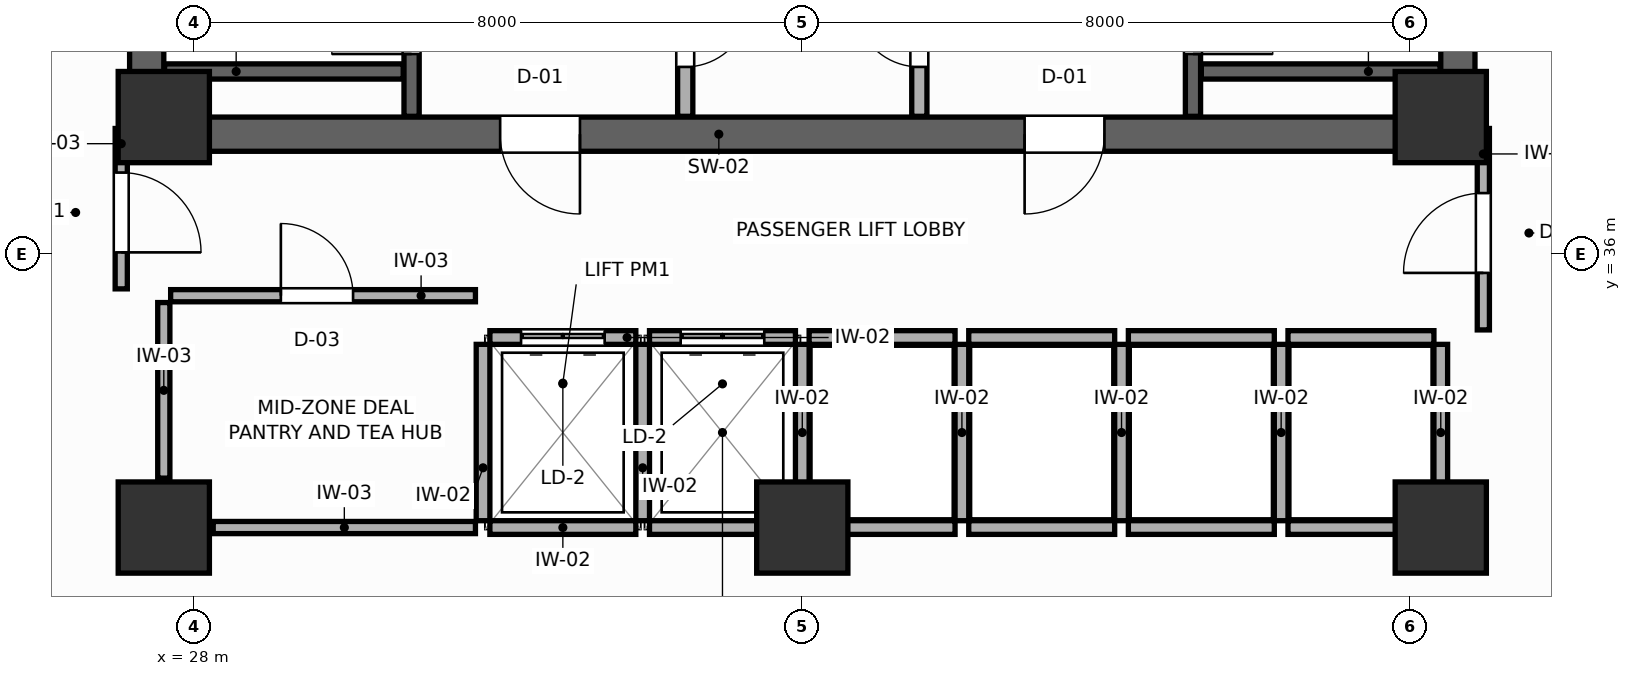
"""IFC4 building model, lengths in metres.
Left out: names, types, materials, properties, quantities, classifications, styles, units other than length and angle.
Written with IfcOpenShell. Run it as: python <this file> out.ifc"""

import sys

from ifc_helpers import new_model, si_unit, direction, frame, frame_2d, origin, origin_2d, place, context, subcontext, project, spatial, rectangle, extrude, source, transform, mapped, element, fill, save


model = new_model("IFC4")
c1 = context("Model", 3, precision=1e-05, world=origin(), true_north=direction((0.0, 1.0)))
c2 = subcontext(c1, "Body", "Model", "MODEL_VIEW")
j1 = project(units=[si_unit("LENGTHUNIT", "METRE"), si_unit("PLANEANGLEUNIT", "RADIAN")], contexts=[c1])
p1 = place(None, origin())
s1 = spatial("IfcSite", under=j1, at=p1, CompositionType="ELEMENT")
p2 = place(p1, origin())
s2 = spatial("IfcBuilding", under=s1, at=p2, CompositionType="ELEMENT")
p3 = place(p2, frame((0.0, 0.0, 139.8)))
s3 = spatial("IfcBuildingStorey", under=s2, at=p3, CompositionType="ELEMENT", Elevation=139.8)
p4 = place(p3, frame((27.15, 37.575, 0.0), z_axis=(0.0, 0.0, 1.0), x_axis=(1.0, 0.0, 0.0)))
e1 = element("IfcWall", 1, at=p4, inside=s3, PredefinedType="SHEAR", context=c2, shape_type="SweptSolid", body=[
    extrude(rectangle(XDim=17.7, YDim=0.45, at=frame_2d((8.85, 0.0))), origin(), (0.0, 0.0, 1.0), 3.6),
])
p5 = place(p4, frame((4.875, 0.0, 0.0)))
e2 = element("IfcOpeningElement", 2, at=p5, cuts=e1, PredefinedType="OPENING", context=c2, shape_type="SweptSolid", body=[
    extrude(rectangle(XDim=1.05, YDim=2.1, at=frame_2d((0.525, 1.05))), frame((0.0, 0.235, 0.0), z_axis=(0.0, -1.0, 0.0), x_axis=(1.0, 0.0, 0.0)), (0.0, 0.0, 1.0), 0.47),
])
p6 = place(p4, frame((11.775, 0.0, 0.0)))
e3 = element("IfcOpeningElement", 3, at=p6, cuts=e1, PredefinedType="OPENING", context=c2, shape_type="SweptSolid", body=[
    extrude(rectangle(XDim=1.05, YDim=2.1, at=frame_2d((0.525, 1.05))), frame((0.0, 0.235, 0.0), z_axis=(0.0, -1.0, 0.0), x_axis=(1.0, 0.0, 0.0)), (0.0, 0.0, 1.0), 0.47),
])
for number, where, z_axis, x_axis in (
    (4, (27.375, 37.8, 0.0), (0.0, 0.0, 1.0), (0.0, 1.0, 0.0)),
    (5, (44.625, 37.8, 0.0), (0.0, 0.0, 1.0), (0.0, 1.0, 0.0)),
):
    element("IfcWall", number, at=place(p3, frame(where, z_axis=z_axis, x_axis=x_axis)), inside=s3, PredefinedType="SHEAR", context=c2, shape_type="SweptSolid", body=[
        extrude(rectangle(XDim=9.0, YDim=0.45, at=frame_2d((4.5, 0.0))), origin(), (0.0, 0.0, 1.0), 3.6),
    ])
m1 = source(origin(), c2, "Body", "SweptSolid", [
    extrude(rectangle(XDim=1.2, YDim=1.2, at=origin_2d()), origin(), (0.0, 0.0, 1.0), 3.6),
])
for number, where, z_axis, x_axis in (
    (6, (27.6, 37.8, 0.0), (0.0, 0.0, 1.0), (1.0, 0.0, 0.0)),
    (7, (44.4, 37.8, 0.0), (0.0, 0.0, 1.0), (1.0, 0.0, 0.0)),
    (8, (27.6, 32.4, 0.0), (0.0, 0.0, 1.0), (1.0, 0.0, 0.0)),
    (9, (44.4, 32.4, 0.0), (0.0, 0.0, 1.0), (1.0, 0.0, 0.0)),
    (10, (36.0, 32.4, 0.0), (0.0, 0.0, 1.0), (1.0, 0.0, 0.0)),
):
    element("IfcColumn", number, at=place(p3, frame(where, z_axis=z_axis, x_axis=x_axis)), inside=s3, PredefinedType="COLUMN", context=c2, shape_type="MappedRepresentation", body=[
        mapped(m1, transform((0.0, 0.0, 0.0), scale=1.0)),
    ])
p7 = place(p3, frame((30.86, 37.81, 0.0), z_axis=(0.0, 0.0, 1.0), x_axis=(0.0, 1.0, 0.0)))
e11 = element("IfcWall", 11, at=p7, inside=s3, PredefinedType="SHEAR", context=c2, shape_type="SweptSolid", body=[
    extrude(rectangle(XDim=8.98, YDim=0.2, at=frame_2d((4.49, 0.0))), origin(), (0.0, 0.0, 1.0), 3.6),
])
p8 = place(p7, frame((0.82, 0.0, 0.0)))
e12 = element("IfcOpeningElement", 12, at=p8, cuts=e11, PredefinedType="OPENING", context=c2, shape_type="SweptSolid", body=[
    extrude(rectangle(XDim=1.05, YDim=2.1, at=frame_2d((0.525, 1.05))), frame((0.0, 0.11, 0.0), z_axis=(0.0, -1.0, 0.0), x_axis=(1.0, 0.0, 0.0)), (0.0, 0.0, 1.0), 0.22),
])
p9 = place(p3, frame((27.61, 38.4, 0.0), z_axis=(0.0, 0.0, 1.0), x_axis=(1.0, 0.0, 0.0)))
e13 = element("IfcWall", 13, at=p9, inside=s3, PredefinedType="SHEAR", context=c2, shape_type="SweptSolid", body=[
    extrude(rectangle(XDim=3.14, YDim=0.2, at=frame_2d((1.57, 0.0))), origin(), (0.0, 0.0, 1.0), 3.6),
])
p10 = place(p3, frame((41.14, 37.81, 0.0), z_axis=(0.0, 0.0, 1.0), x_axis=(0.0, 1.0, 0.0)))
e14 = element("IfcWall", 14, at=p10, inside=s3, PredefinedType="SHEAR", context=c2, shape_type="SweptSolid", body=[
    extrude(rectangle(XDim=8.98, YDim=0.2, at=frame_2d((4.49, 0.0))), origin(), (0.0, 0.0, 1.0), 3.6),
])
p11 = place(p10, frame((0.82, 0.0, 0.0)))
e15 = element("IfcOpeningElement", 15, at=p11, cuts=e14, PredefinedType="OPENING", context=c2, shape_type="SweptSolid", body=[
    extrude(rectangle(XDim=1.05, YDim=2.1, at=frame_2d((0.525, 1.05))), frame((0.0, 0.11, 0.0), z_axis=(0.0, -1.0, 0.0), x_axis=(1.0, 0.0, 0.0)), (0.0, 0.0, 1.0), 0.22),
])
p12 = place(p3, frame((41.25, 38.4, 0.0), z_axis=(0.0, 0.0, 1.0), x_axis=(1.0, 0.0, 0.0)))
e16 = element("IfcWall", 16, at=p12, inside=s3, PredefinedType="SHEAR", context=c2, shape_type="SweptSolid", body=[
    extrude(rectangle(XDim=3.14, YDim=0.2, at=frame_2d((1.57, 0.0))), origin(), (0.0, 0.0, 1.0), 3.6),
])
p13 = place(p3, frame((34.46, 37.81, 0.0), z_axis=(0.0, 0.0, 1.0), x_axis=(0.0, 1.0, 0.0)))
e17 = element("IfcWall", 17, at=p13, inside=s3, PredefinedType="PARTITIONING", context=c2, shape_type="SweptSolid", body=[
    extrude(rectangle(XDim=8.98, YDim=0.2, at=frame_2d((4.49, 0.0))), origin(), (0.0, 0.0, 1.0), 3.4),
])
p14 = place(p13, frame((0.65, 0.0, 0.0)))
e18 = element("IfcOpeningElement", 18, at=p14, cuts=e17, PredefinedType="OPENING", context=c2, shape_type="SweptSolid", body=[
    extrude(rectangle(XDim=0.85, YDim=2.05, at=frame_2d((0.425, 1.025))), frame((0.0, 0.11, 0.0), z_axis=(0.0, -1.0, 0.0), x_axis=(1.0, 0.0, 0.0)), (0.0, 0.0, 1.0), 0.22),
])
p15 = place(p3, frame((37.54, 37.81, 0.0), z_axis=(0.0, 0.0, 1.0), x_axis=(0.0, 1.0, 0.0)))
e19 = element("IfcWall", 19, at=p15, inside=s3, PredefinedType="PARTITIONING", context=c2, shape_type="SweptSolid", body=[
    extrude(rectangle(XDim=8.98, YDim=0.2, at=frame_2d((4.49, 0.0))), origin(), (0.0, 0.0, 1.0), 3.4),
])
p16 = place(p15, frame((0.65, 0.0, 0.0)))
e20 = element("IfcOpeningElement", 20, at=p16, cuts=e19, PredefinedType="OPENING", context=c2, shape_type="SweptSolid", body=[
    extrude(rectangle(XDim=0.85, YDim=2.05, at=frame_2d((0.425, 1.025))), frame((0.0, 0.11, 0.0), z_axis=(0.0, -1.0, 0.0), x_axis=(1.0, 0.0, 0.0)), (0.0, 0.0, 1.0), 0.22),
])
p17 = place(p3, frame((31.89, 34.9, 0.0), z_axis=(0.0, 0.0, 1.0), x_axis=(1.0, 0.0, 0.0)))
e21 = element("IfcWall", 21, at=p17, inside=s3, PredefinedType="PARTITIONING", context=c2, shape_type="SweptSolid", body=[
    extrude(rectangle(XDim=1.92, YDim=0.18, at=frame_2d((0.96, 0.0))), origin(), (0.0, 0.0, 1.0), 3.4),
])
p18 = place(p17, frame((0.41, 0.0, 0.0)))
e22 = element("IfcOpeningElement", 22, at=p18, cuts=e21, PredefinedType="OPENING", context=c2, shape_type="SweptSolid", body=[
    extrude(rectangle(XDim=1.1, YDim=2.1, at=frame_2d((0.55, 1.05))), frame((0.0, 0.1, 0.0), z_axis=(0.0, -1.0, 0.0), x_axis=(1.0, 0.0, 0.0)), (0.0, 0.0, 1.0), 0.2),
])
p19 = place(p3, frame((31.89, 32.4, 0.0), z_axis=(0.0, 0.0, 1.0), x_axis=(1.0, 0.0, 0.0)))
e23 = element("IfcWall", 23, at=p19, inside=s3, PredefinedType="PARTITIONING", context=c2, shape_type="SweptSolid", body=[
    extrude(rectangle(XDim=1.92, YDim=0.18, at=frame_2d((0.96, 0.0))), origin(), (0.0, 0.0, 1.0), 2.95),
])
p20 = place(p3, frame((31.8, 32.49, 0.0), z_axis=(0.0, 0.0, 1.0), x_axis=(0.0, 1.0, 0.0)))
e24 = element("IfcWall", 24, at=p20, inside=s3, PredefinedType="PARTITIONING", context=c2, shape_type="SweptSolid", body=[
    extrude(rectangle(XDim=2.32, YDim=0.18, at=frame_2d((1.16, 0.0))), origin(), (0.0, 0.0, 1.0), 3.4),
])
p21 = place(p3, frame((33.99, 34.9, 0.0), z_axis=(0.0, 0.0, 1.0), x_axis=(1.0, 0.0, 0.0)))
e25 = element("IfcWall", 25, at=p21, inside=s3, PredefinedType="PARTITIONING", context=c2, shape_type="SweptSolid", body=[
    extrude(rectangle(XDim=1.92, YDim=0.18, at=frame_2d((0.96, 0.0))), origin(), (0.0, 0.0, 1.0), 3.4),
])
p22 = place(p21, frame((0.41, 0.0, 0.0)))
e26 = element("IfcOpeningElement", 26, at=p22, cuts=e25, PredefinedType="OPENING", context=c2, shape_type="SweptSolid", body=[
    extrude(rectangle(XDim=1.1, YDim=2.1, at=frame_2d((0.55, 1.05))), frame((0.0, 0.1, 0.0), z_axis=(0.0, -1.0, 0.0), x_axis=(1.0, 0.0, 0.0)), (0.0, 0.0, 1.0), 0.2),
])
p23 = place(p3, frame((33.99, 32.4, 0.0), z_axis=(0.0, 0.0, 1.0), x_axis=(1.0, 0.0, 0.0)))
e27 = element("IfcWall", 27, at=p23, inside=s3, PredefinedType="PARTITIONING", context=c2, shape_type="SweptSolid", body=[
    extrude(rectangle(XDim=1.92, YDim=0.18, at=frame_2d((0.96, 0.0))), origin(), (0.0, 0.0, 1.0), 2.95),
])
p24 = place(p3, frame((33.9, 32.49, 0.0), z_axis=(0.0, 0.0, 1.0), x_axis=(0.0, 1.0, 0.0)))
e28 = element("IfcWall", 28, at=p24, inside=s3, PredefinedType="PARTITIONING", context=c2, shape_type="SweptSolid", body=[
    extrude(rectangle(XDim=2.32, YDim=0.18, at=frame_2d((1.16, 0.0))), origin(), (0.0, 0.0, 1.0), 3.4),
])
p25 = place(p3, frame((36.09, 34.9, 0.0), z_axis=(0.0, 0.0, 1.0), x_axis=(1.0, 0.0, 0.0)))
e29 = element("IfcWall", 29, at=p25, inside=s3, PredefinedType="PARTITIONING", context=c2, shape_type="SweptSolid", body=[
    extrude(rectangle(XDim=1.92, YDim=0.18, at=frame_2d((0.96, 0.0))), origin(), (0.0, 0.0, 1.0), 3.4),
])
p26 = place(p3, frame((36.09, 32.4, 0.0), z_axis=(0.0, 0.0, 1.0), x_axis=(1.0, 0.0, 0.0)))
e30 = element("IfcWall", 30, at=p26, inside=s3, PredefinedType="PARTITIONING", context=c2, shape_type="SweptSolid", body=[
    extrude(rectangle(XDim=1.92, YDim=0.18, at=frame_2d((0.96, 0.0))), origin(), (0.0, 0.0, 1.0), 2.95),
])
p27 = place(p3, frame((36.0, 32.49, 0.0), z_axis=(0.0, 0.0, 1.0), x_axis=(0.0, 1.0, 0.0)))
e31 = element("IfcWall", 31, at=p27, inside=s3, PredefinedType="PARTITIONING", context=c2, shape_type="SweptSolid", body=[
    extrude(rectangle(XDim=2.32, YDim=0.18, at=frame_2d((1.16, 0.0))), origin(), (0.0, 0.0, 1.0), 3.4),
])
p28 = place(p3, frame((38.19, 34.9, 0.0), z_axis=(0.0, 0.0, 1.0), x_axis=(1.0, 0.0, 0.0)))
e32 = element("IfcWall", 32, at=p28, inside=s3, PredefinedType="PARTITIONING", context=c2, shape_type="SweptSolid", body=[
    extrude(rectangle(XDim=1.92, YDim=0.18, at=frame_2d((0.96, 0.0))), origin(), (0.0, 0.0, 1.0), 3.4),
])
p29 = place(p3, frame((38.19, 32.4, 0.0), z_axis=(0.0, 0.0, 1.0), x_axis=(1.0, 0.0, 0.0)))
e33 = element("IfcWall", 33, at=p29, inside=s3, PredefinedType="PARTITIONING", context=c2, shape_type="SweptSolid", body=[
    extrude(rectangle(XDim=1.92, YDim=0.18, at=frame_2d((0.96, 0.0))), origin(), (0.0, 0.0, 1.0), 2.95),
])
p30 = place(p3, frame((38.1, 32.49, 0.0), z_axis=(0.0, 0.0, 1.0), x_axis=(0.0, 1.0, 0.0)))
e34 = element("IfcWall", 34, at=p30, inside=s3, PredefinedType="PARTITIONING", context=c2, shape_type="SweptSolid", body=[
    extrude(rectangle(XDim=2.32, YDim=0.18, at=frame_2d((1.16, 0.0))), origin(), (0.0, 0.0, 1.0), 3.4),
])
p31 = place(p3, frame((40.29, 34.9, 0.0), z_axis=(0.0, 0.0, 1.0), x_axis=(1.0, 0.0, 0.0)))
e35 = element("IfcWall", 35, at=p31, inside=s3, PredefinedType="PARTITIONING", context=c2, shape_type="SweptSolid", body=[
    extrude(rectangle(XDim=1.92, YDim=0.18, at=frame_2d((0.96, 0.0))), origin(), (0.0, 0.0, 1.0), 3.4),
])
p32 = place(p3, frame((40.29, 32.4, 0.0), z_axis=(0.0, 0.0, 1.0), x_axis=(1.0, 0.0, 0.0)))
e36 = element("IfcWall", 36, at=p32, inside=s3, PredefinedType="PARTITIONING", context=c2, shape_type="SweptSolid", body=[
    extrude(rectangle(XDim=1.92, YDim=0.18, at=frame_2d((0.96, 0.0))), origin(), (0.0, 0.0, 1.0), 2.95),
])
p33 = place(p3, frame((40.2, 32.49, 0.0), z_axis=(0.0, 0.0, 1.0), x_axis=(0.0, 1.0, 0.0)))
e37 = element("IfcWall", 37, at=p33, inside=s3, PredefinedType="PARTITIONING", context=c2, shape_type="SweptSolid", body=[
    extrude(rectangle(XDim=2.32, YDim=0.18, at=frame_2d((1.16, 0.0))), origin(), (0.0, 0.0, 1.0), 3.4),
])
p34 = place(p3, frame((42.39, 34.9, 0.0), z_axis=(0.0, 0.0, 1.0), x_axis=(1.0, 0.0, 0.0)))
e38 = element("IfcWall", 38, at=p34, inside=s3, PredefinedType="PARTITIONING", context=c2, shape_type="SweptSolid", body=[
    extrude(rectangle(XDim=1.92, YDim=0.18, at=frame_2d((0.96, 0.0))), origin(), (0.0, 0.0, 1.0), 3.4),
])
p35 = place(p3, frame((42.39, 32.4, 0.0), z_axis=(0.0, 0.0, 1.0), x_axis=(1.0, 0.0, 0.0)))
e39 = element("IfcWall", 39, at=p35, inside=s3, PredefinedType="PARTITIONING", context=c2, shape_type="SweptSolid", body=[
    extrude(rectangle(XDim=1.92, YDim=0.18, at=frame_2d((0.96, 0.0))), origin(), (0.0, 0.0, 1.0), 2.95),
])
for number, where, z_axis, x_axis in (
    (40, (42.3, 32.49, 0.0), (0.0, 0.0, 1.0), (0.0, 1.0, 0.0)),
    (41, (44.4, 32.49, 0.0), (0.0, 0.0, 1.0), (0.0, 1.0, 0.0)),
):
    element("IfcWall", number, at=place(p3, frame(where, z_axis=z_axis, x_axis=x_axis)), inside=s3, PredefinedType="PARTITIONING", context=c2, shape_type="SweptSolid", body=[
        extrude(rectangle(XDim=2.32, YDim=0.18, at=frame_2d((1.16, 0.0))), origin(), (0.0, 0.0, 1.0), 3.4),
    ])
p36 = place(p3, frame((28.25, 32.4, 0.0), z_axis=(0.0, 0.0, 1.0), x_axis=(1.0, 0.0, 0.0)))
e42 = element("IfcWall", 42, at=p36, inside=s3, PredefinedType="PARTITIONING", context=c2, shape_type="SweptSolid", body=[
    extrude(rectangle(XDim=3.45, YDim=0.16, at=frame_2d((1.725, 0.0))), origin(), (0.0, 0.0, 1.0), 2.95),
])
p37 = place(p3, frame((27.6, 33.05, 0.0), z_axis=(0.0, 0.0, 1.0), x_axis=(0.0, 1.0, 0.0)))
e43 = element("IfcWall", 43, at=p37, inside=s3, PredefinedType="PARTITIONING", context=c2, shape_type="SweptSolid", body=[
    extrude(rectangle(XDim=2.31, YDim=0.16, at=frame_2d((1.155, 0.0))), origin(), (0.0, 0.0, 1.0), 3.4),
])
p38 = place(p3, frame((27.69, 35.45, 0.0), z_axis=(0.0, 0.0, 1.0), x_axis=(1.0, 0.0, 0.0)))
e44 = element("IfcWall", 44, at=p38, inside=s3, PredefinedType="PARTITIONING", context=c2, shape_type="SweptSolid", body=[
    extrude(rectangle(XDim=4.01, YDim=0.16, at=frame_2d((2.005, 0.0))), origin(), (0.0, 0.0, 1.0), 3.4),
])
p39 = place(p38, frame((1.45, 0.0, 0.0)))
e45 = element("IfcOpeningElement", 45, at=p39, cuts=e44, PredefinedType="OPENING", context=c2, shape_type="SweptSolid", body=[
    extrude(rectangle(XDim=0.95, YDim=2.05, at=frame_2d((0.475, 1.025))), frame((0.0, 0.09, 0.0), z_axis=(0.0, -1.0, 0.0), x_axis=(1.0, 0.0, 0.0)), (0.0, 0.0, 1.0), 0.18),
])
p40 = place(p3, frame((27.04, 35.54, 0.0), z_axis=(0.0, 0.0, 1.0), x_axis=(0.0, 1.0, 0.0)))
e46 = element("IfcWall", 46, at=p40, inside=s3, PredefinedType="PARTITIONING", context=c2, shape_type="SweptSolid", body=[
    extrude(rectangle(XDim=2.11, YDim=0.16, at=frame_2d((1.055, 0.0))), origin(), (0.0, 0.0, 1.0), 3.4),
])
p41 = place(p40, frame((0.48, 0.0, 0.0)))
e47 = element("IfcOpeningElement", 47, at=p41, cuts=e46, PredefinedType="OPENING", context=c2, shape_type="SweptSolid", body=[
    extrude(rectangle(XDim=1.05, YDim=2.1, at=frame_2d((0.525, 1.05))), frame((0.0, 0.09, 0.0), z_axis=(0.0, -1.0, 0.0), x_axis=(1.0, 0.0, 0.0)), (0.0, 0.0, 1.0), 0.18),
])
p42 = place(p3, frame((44.96, 35.0, 0.0), z_axis=(0.0, 0.0, 1.0), x_axis=(0.0, 1.0, 0.0)))
e48 = element("IfcWall", 48, at=p42, inside=s3, PredefinedType="PARTITIONING", context=c2, shape_type="SweptSolid", body=[
    extrude(rectangle(XDim=2.65, YDim=0.16, at=frame_2d((1.325, 0.0))), origin(), (0.0, 0.0, 1.0), 3.4),
])
p43 = place(p42, frame((0.75, 0.0, 0.0)))
e49 = element("IfcOpeningElement", 49, at=p43, cuts=e48, PredefinedType="OPENING", context=c2, shape_type="SweptSolid", body=[
    extrude(rectangle(XDim=1.05, YDim=2.1, at=frame_2d((0.525, 1.05))), frame((0.0, 0.09, 0.0), z_axis=(0.0, -1.0, 0.0), x_axis=(1.0, 0.0, 0.0)), (0.0, 0.0, 1.0), 0.18),
])
p44 = place(p8, origin())
e50 = element("IfcDoor", 50, at=p44, inside=s3, OperationType="SINGLE_SWING_LEFT", PredefinedType="DOOR", context=c2, shape_type="SweptSolid", body=[
    extrude(rectangle(XDim=1.05, YDim=2.1, at=frame_2d((0.525, 1.05))), frame((0.0, 0.025, 0.0), z_axis=(0.0, -1.0, 0.0), x_axis=(1.0, 0.0, 0.0)), (0.0, 0.0, 1.0), 0.05),
])
fill(e12, e50)
p45 = place(p11, frame((1.05, 0.0, 0.0), z_axis=(0.0, 0.0, 1.0), x_axis=(-1.0, 0.0, 0.0)))
e51 = element("IfcDoor", 51, at=p45, inside=s3, OperationType="SINGLE_SWING_RIGHT", PredefinedType="DOOR", context=c2, shape_type="SweptSolid", body=[
    extrude(rectangle(XDim=1.05, YDim=2.1, at=frame_2d((0.525, 1.05))), frame((0.0, 0.025, 0.0), z_axis=(0.0, -1.0, 0.0), x_axis=(1.0, 0.0, 0.0)), (0.0, 0.0, 1.0), 0.05),
])
fill(e15, e51)
p46 = place(p14, frame((0.85, 0.0, 0.0), z_axis=(0.0, 0.0, 1.0), x_axis=(-1.0, 0.0, 0.0)))
e52 = element("IfcDoor", 52, at=p46, inside=s3, OperationType="SINGLE_SWING_LEFT", PredefinedType="DOOR", context=c2, shape_type="SweptSolid", body=[
    extrude(rectangle(XDim=0.85, YDim=2.05, at=frame_2d((0.425, 1.025))), frame((0.0, 0.025, 0.0), z_axis=(0.0, -1.0, 0.0), x_axis=(1.0, 0.0, 0.0)), (0.0, 0.0, 1.0), 0.05),
])
fill(e18, e52)
p47 = place(p16, origin())
e53 = element("IfcDoor", 53, at=p47, inside=s3, OperationType="SINGLE_SWING_RIGHT", PredefinedType="DOOR", context=c2, shape_type="SweptSolid", body=[
    extrude(rectangle(XDim=0.85, YDim=2.05, at=frame_2d((0.425, 1.025))), frame((0.0, 0.025, 0.0), z_axis=(0.0, -1.0, 0.0), x_axis=(1.0, 0.0, 0.0)), (0.0, 0.0, 1.0), 0.05),
])
fill(e20, e53)
p48 = place(p18, origin())
e54 = element("IfcDoor", 54, at=p48, inside=s3, OperationType="DOUBLE_DOOR_SLIDING", PredefinedType="DOOR", context=c2, shape_type="SweptSolid", body=[
    extrude(rectangle(XDim=1.1, YDim=2.1, at=frame_2d((0.55, 1.05))), frame((0.0, 0.025, 0.0), z_axis=(0.0, -1.0, 0.0), x_axis=(1.0, 0.0, 0.0)), (0.0, 0.0, 1.0), 0.05),
])
fill(e22, e54)
p49 = place(p22, origin())
e55 = element("IfcDoor", 55, at=p49, inside=s3, OperationType="DOUBLE_DOOR_SLIDING", PredefinedType="DOOR", context=c2, shape_type="SweptSolid", body=[
    extrude(rectangle(XDim=1.1, YDim=2.1, at=frame_2d((0.55, 1.05))), frame((0.0, 0.025, 0.0), z_axis=(0.0, -1.0, 0.0), x_axis=(1.0, 0.0, 0.0)), (0.0, 0.0, 1.0), 0.05),
])
fill(e26, e55)
p50 = place(p39, origin())
e56 = element("IfcDoor", 56, at=p50, inside=s3, OperationType="SINGLE_SWING_LEFT", PredefinedType="DOOR", context=c2, shape_type="SweptSolid", body=[
    extrude(rectangle(XDim=0.95, YDim=2.05, at=frame_2d((0.475, 1.025))), frame((0.0, 0.025, 0.0), z_axis=(0.0, -1.0, 0.0), x_axis=(1.0, 0.0, 0.0)), (0.0, 0.0, 1.0), 0.05),
])
fill(e45, e56)
p51 = place(p41, frame((1.05, 0.0, 0.0), z_axis=(0.0, 0.0, 1.0), x_axis=(-1.0, 0.0, 0.0)))
e57 = element("IfcDoor", 57, at=p51, inside=s3, OperationType="SINGLE_SWING_RIGHT", PredefinedType="DOOR", context=c2, shape_type="SweptSolid", body=[
    extrude(rectangle(XDim=1.05, YDim=2.1, at=frame_2d((0.525, 1.05))), frame((0.0, 0.025, 0.0), z_axis=(0.0, -1.0, 0.0), x_axis=(1.0, 0.0, 0.0)), (0.0, 0.0, 1.0), 0.05),
])
fill(e47, e57)
p52 = place(p43, origin())
e58 = element("IfcDoor", 58, at=p52, inside=s3, OperationType="SINGLE_SWING_LEFT", PredefinedType="DOOR", context=c2, shape_type="SweptSolid", body=[
    extrude(rectangle(XDim=1.05, YDim=2.1, at=frame_2d((0.525, 1.05))), frame((0.0, 0.025, 0.0), z_axis=(0.0, -1.0, 0.0), x_axis=(1.0, 0.0, 0.0)), (0.0, 0.0, 1.0), 0.05),
])
fill(e49, e58)
p53 = place(p5, frame((1.05, 0.0, 0.0), z_axis=(0.0, 0.0, 1.0), x_axis=(-1.0, 0.0, 0.0)))
e59 = element("IfcDoor", 59, at=p53, inside=s3, OperationType="SINGLE_SWING_LEFT", PredefinedType="DOOR", context=c2, shape_type="SweptSolid", body=[
    extrude(rectangle(XDim=1.05, YDim=2.1, at=frame_2d((0.525, 1.05))), frame((0.0, 0.025, 0.0), z_axis=(0.0, -1.0, 0.0), x_axis=(1.0, 0.0, 0.0)), (0.0, 0.0, 1.0), 0.05),
])
fill(e2, e59)
p54 = place(p6, frame((1.05, 0.0, 0.0), z_axis=(0.0, 0.0, 1.0), x_axis=(-1.0, 0.0, 0.0)))
e60 = element("IfcDoor", 60, at=p54, inside=s3, OperationType="SINGLE_SWING_RIGHT", PredefinedType="DOOR", context=c2, shape_type="SweptSolid", body=[
    extrude(rectangle(XDim=1.05, YDim=2.1, at=frame_2d((0.525, 1.05))), frame((0.0, 0.025, 0.0), z_axis=(0.0, -1.0, 0.0), x_axis=(1.0, 0.0, 0.0)), (0.0, 0.0, 1.0), 0.05),
])
fill(e3, e60)
save(model, sys.argv[1])
